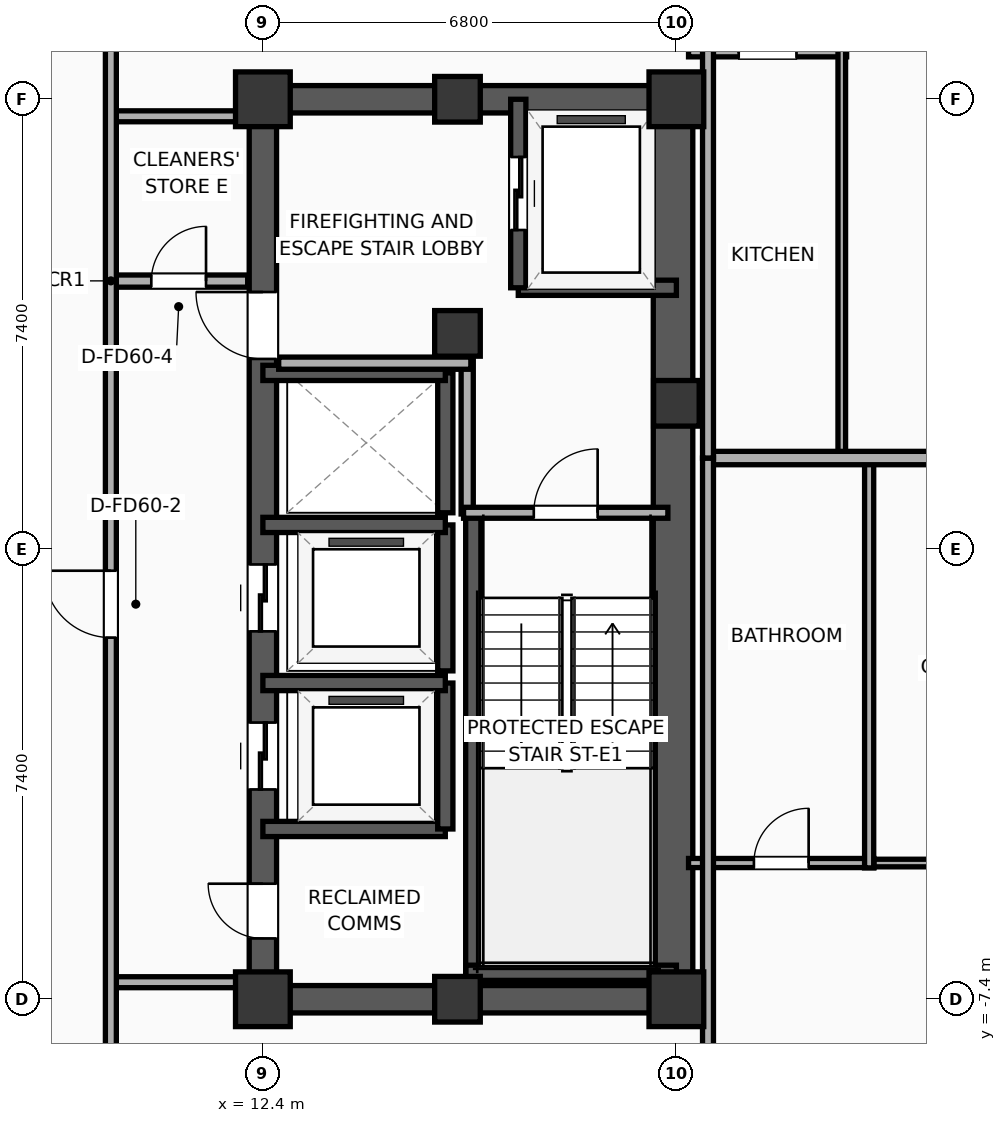
"""IFC4 building model, lengths in metres.
Left out: names, types, materials, properties, quantities, classifications, styles, units other than length and angle.
Written with IfcOpenShell. Run it as: python <this file> out.ifc"""

import sys

from ifc_helpers import new_model, si_unit, direction, frame, frame_2d, origin, origin_2d, place, context, subcontext, project, spatial, rectangle, extrude, element, fill, save


model = new_model("IFC4")
c1 = context("Model", 3, precision=1e-05, world=origin(), true_north=direction((0.0, 1.0)))
c2 = subcontext(c1, "Body", "Model", "MODEL_VIEW")
j1 = project(units=[si_unit("LENGTHUNIT", "METRE"), si_unit("PLANEANGLEUNIT", "RADIAN")], contexts=[c1])
p1 = place(None, origin())
s1 = spatial("IfcSite", under=j1, at=p1, CompositionType="ELEMENT")
p2 = place(p1, origin())
s2 = spatial("IfcBuilding", under=s1, at=p2, CompositionType="ELEMENT")
p3 = place(p2, frame((0.0, 0.0, 163.8)))
s3 = spatial("IfcBuildingStorey", under=s2, at=p3, CompositionType="ELEMENT", Elevation=163.8)
p4 = place(p3, frame((12.4, -7.4, 0.0), z_axis=(0.0, 0.0, 1.0), x_axis=(1.0, 0.0, 0.0)))
e1 = element("IfcColumn", 1, at=p4, inside=s3, PredefinedType="COLUMN", context=c2, shape_type="SweptSolid", body=[
    extrude(rectangle(XDim=0.9, YDim=0.9, at=origin_2d()), origin(), (0.0, 0.0, 1.0), 3.9),
])
p5 = place(p3, frame((15.6, 3.55, 0.0), z_axis=(0.0, 0.0, 1.0), x_axis=(1.0, 0.0, 0.0)))
e2 = element("IfcColumn", 2, at=p5, inside=s3, PredefinedType="COLUMN", context=c2, shape_type="SweptSolid", body=[
    extrude(rectangle(XDim=0.75, YDim=0.75, at=origin_2d()), origin(), (0.0, 0.0, 1.0), 3.9),
])
p6 = place(p3, frame((12.4, 7.4, 0.0), z_axis=(0.0, 0.0, 1.0), x_axis=(1.0, 0.0, 0.0)))
e3 = element("IfcColumn", 3, at=p6, inside=s3, PredefinedType="COLUMN", context=c2, shape_type="SweptSolid", body=[
    extrude(rectangle(XDim=0.9, YDim=0.9, at=origin_2d()), origin(), (0.0, 0.0, 1.0), 3.9),
])
for number, where, z_axis, x_axis in (
    (4, (15.6, -7.4, 0.0), (0.0, 0.0, 1.0), (1.0, 0.0, 0.0)),
    (5, (15.6, 7.4, 0.0), (0.0, 0.0, 1.0), (1.0, 0.0, 0.0)),
):
    element("IfcColumn", number, at=place(p3, frame(where, z_axis=z_axis, x_axis=x_axis)), inside=s3, PredefinedType="COLUMN", context=c2, shape_type="SweptSolid", body=[
        extrude(rectangle(XDim=0.75, YDim=0.75, at=origin_2d()), origin(), (0.0, 0.0, 1.0), 3.9),
    ])
p7 = place(p3, frame((19.2, -7.4, 0.0), z_axis=(0.0, 0.0, 1.0), x_axis=(1.0, 0.0, 0.0)))
e6 = element("IfcColumn", 6, at=p7, inside=s3, PredefinedType="COLUMN", context=c2, shape_type="SweptSolid", body=[
    extrude(rectangle(XDim=0.9, YDim=0.9, at=origin_2d()), origin(), (0.0, 0.0, 1.0), 3.9),
])
p8 = place(p3, frame((19.2, 2.4, 0.0), z_axis=(0.0, 0.0, 1.0), x_axis=(1.0, 0.0, 0.0)))
e7 = element("IfcColumn", 7, at=p8, inside=s3, PredefinedType="COLUMN", context=c2, shape_type="SweptSolid", body=[
    extrude(rectangle(XDim=0.75, YDim=0.75, at=origin_2d()), origin(), (0.0, 0.0, 1.0), 3.9),
])
p9 = place(p3, frame((19.2, 7.4, 0.0), z_axis=(0.0, 0.0, 1.0), x_axis=(1.0, 0.0, 0.0)))
e8 = element("IfcColumn", 8, at=p9, inside=s3, PredefinedType="COLUMN", context=c2, shape_type="SweptSolid", body=[
    extrude(rectangle(XDim=0.9, YDim=0.9, at=origin_2d()), origin(), (0.0, 0.0, 1.0), 3.9),
])
for number, where, z_axis, x_axis in (
    (9, (12.175, -7.4, 0.0), (0.0, 0.0, 1.0), (1.0, 0.0, 0.0)),
    (10, (12.175, 7.4, 0.0), (0.0, 0.0, 1.0), (1.0, 0.0, 0.0)),
):
    element("IfcWall", number, at=place(p3, frame(where, z_axis=z_axis, x_axis=x_axis)), inside=s3, PredefinedType="SHEAR", context=c2, shape_type="SweptSolid", body=[
        extrude(rectangle(XDim=7.25, YDim=0.45, at=frame_2d((3.625, 0.0))), origin(), (0.0, 0.0, 1.0), 3.65),
    ])
p10 = place(p3, frame((12.4, -7.4, 0.0), z_axis=(0.0, 0.0, 1.0), x_axis=(0.0, 1.0, 0.0)))
e11 = element("IfcWall", 11, at=p10, inside=s3, PredefinedType="SHEAR", context=c2, shape_type="SweptSolid", body=[
    extrude(rectangle(XDim=14.8, YDim=0.45, at=frame_2d((7.4, 0.0))), origin(), (0.0, 0.0, 1.0), 3.65),
])
p11 = place(p10, frame((3.45, 0.0, 0.0)))
e12 = element("IfcOpeningElement", 12, at=p11, cuts=e11, PredefinedType="OPENING", context=c2, shape_type="SweptSolid", body=[
    extrude(rectangle(XDim=1.1, YDim=2.05, at=frame_2d((0.55, 1.025))), frame((0.0, 0.235, 0.0), z_axis=(0.0, -1.0, 0.0), x_axis=(1.0, 0.0, 0.0)), (0.0, 0.0, 1.0), 0.47),
])
p12 = place(p10, frame((6.05, 0.0, 0.0)))
e13 = element("IfcOpeningElement", 13, at=p12, cuts=e11, PredefinedType="OPENING", context=c2, shape_type="SweptSolid", body=[
    extrude(rectangle(XDim=1.1, YDim=2.05, at=frame_2d((0.55, 1.025))), frame((0.0, 0.235, 0.0), z_axis=(0.0, -1.0, 0.0), x_axis=(1.0, 0.0, 0.0)), (0.0, 0.0, 1.0), 0.47),
])
p13 = place(p10, frame((10.53, 0.0, 0.0)))
e14 = element("IfcOpeningElement", 14, at=p13, cuts=e11, PredefinedType="OPENING", context=c2, shape_type="SweptSolid", body=[
    extrude(rectangle(XDim=1.1, YDim=2.05, at=frame_2d((0.55, 1.025))), frame((0.0, 0.235, 0.0), z_axis=(0.0, -1.0, 0.0), x_axis=(1.0, 0.0, 0.0)), (0.0, 0.0, 1.0), 0.47),
])
p14 = place(p10, frame((1.0, 0.0, 0.0)))
e15 = element("IfcOpeningElement", 15, at=p14, cuts=e11, PredefinedType="OPENING", context=c2, shape_type="SweptSolid", body=[
    extrude(rectangle(XDim=0.9, YDim=2.05, at=frame_2d((0.45, 1.025))), frame((0.0, 0.235, 0.0), z_axis=(0.0, -1.0, 0.0), x_axis=(1.0, 0.0, 0.0)), (0.0, 0.0, 1.0), 0.47),
])
p15 = place(p3, frame((19.145, -7.4, 0.0), z_axis=(0.0, 0.0, 1.0), x_axis=(0.0, 1.0, 0.0)))
e16 = element("IfcWall", 16, at=p15, inside=s3, PredefinedType="SHEAR", context=c2, shape_type="SweptSolid", body=[
    extrude(rectangle(XDim=14.8, YDim=0.65, at=frame_2d((7.4, 0.0))), origin(), (0.0, 0.0, 1.0), 3.65),
])
p16 = place(p3, frame((15.86, -7.085, 0.0), z_axis=(0.0, 0.0, 1.0), x_axis=(0.0, 1.0, 0.0)))
e17 = element("IfcWall", 17, at=p16, inside=s3, PredefinedType="SOLIDWALL", context=c2, shape_type="SweptSolid", body=[
    extrude(rectangle(XDim=7.685, YDim=0.25, at=frame_2d((3.843, 0.0))), origin(), (0.0, 0.0, 1.0), 3.65),
])
p17 = place(p3, frame((15.74, -6.965, 0.0), z_axis=(0.0, 0.0, 1.0), x_axis=(1.0, 0.0, 0.0)))
e18 = element("IfcWall", 18, at=p17, inside=s3, PredefinedType="SOLIDWALL", context=c2, shape_type="SweptSolid", body=[
    extrude(rectangle(XDim=3.46, YDim=0.25, at=frame_2d((1.73, 0.0))), origin(), (0.0, 0.0, 1.0), 3.65),
])
p18 = place(p3, frame((16.6, 4.3, 0.0), z_axis=(0.0, 0.0, 1.0), x_axis=(1.0, 0.0, 0.0)))
e19 = element("IfcWall", 19, at=p18, inside=s3, PredefinedType="SOLIDWALL", context=c2, shape_type="SweptSolid", body=[
    extrude(rectangle(XDim=2.6, YDim=0.25, at=frame_2d((1.3, 0.0))), origin(), (0.0, 0.0, 1.0), 3.65),
])
p19 = place(p3, frame((16.6, 7.4, 0.0), z_axis=(0.0, 0.0, 1.0), x_axis=(0.0, -1.0, 0.0)))
e20 = element("IfcWall", 20, at=p19, inside=s3, PredefinedType="SOLIDWALL", context=c2, shape_type="SweptSolid", body=[
    extrude(rectangle(XDim=3.1, YDim=0.25, at=frame_2d((1.55, 0.0))), origin(), (0.0, 0.0, 1.0), 3.65),
])
p20 = place(p19, frame((0.95, 0.0, 0.0)))
e21 = element("IfcOpeningElement", 21, at=p20, cuts=e20, PredefinedType="OPENING", context=c2, shape_type="SweptSolid", body=[
    extrude(rectangle(XDim=1.2, YDim=2.05, at=frame_2d((0.6, 1.025))), frame((0.0, 0.135, 0.0), z_axis=(0.0, -1.0, 0.0), x_axis=(1.0, 0.0, 0.0)), (0.0, 0.0, 1.0), 0.27),
])
p21 = place(p3, frame((12.4, -4.6, 0.0), z_axis=(0.0, 0.0, 1.0), x_axis=(1.0, 0.0, 0.0)))
e22 = element("IfcWall", 22, at=p21, inside=s3, PredefinedType="SOLIDWALL", context=c2, shape_type="SweptSolid", body=[
    extrude(rectangle(XDim=3.0, YDim=0.25, at=frame_2d((1.5, 0.0))), origin(), (0.0, 0.0, 1.0), 3.65),
])
p22 = place(p3, frame((15.4, -4.6, 0.0), z_axis=(0.0, 0.0, 1.0), x_axis=(0.0, 1.0, 0.0)))
e23 = element("IfcWall", 23, at=p22, inside=s3, PredefinedType="SOLIDWALL", context=c2, shape_type="SweptSolid", body=[
    extrude(rectangle(XDim=2.4, YDim=0.25, at=frame_2d((1.2, 0.0))), origin(), (0.0, 0.0, 1.0), 3.65),
])
p23 = place(p3, frame((15.4, -2.2, 0.0), z_axis=(0.0, 0.0, 1.0), x_axis=(-1.0, 0.0, 0.0)))
e24 = element("IfcWall", 24, at=p23, inside=s3, PredefinedType="SOLIDWALL", context=c2, shape_type="SweptSolid", body=[
    extrude(rectangle(XDim=3.0, YDim=0.25, at=frame_2d((1.5, 0.0))), origin(), (0.0, 0.0, 1.0), 3.65),
])
p24 = place(p3, frame((15.4, -2.0, 0.0), z_axis=(0.0, 0.0, 1.0), x_axis=(0.0, 1.0, 0.0)))
e25 = element("IfcWall", 25, at=p24, inside=s3, PredefinedType="SOLIDWALL", context=c2, shape_type="SweptSolid", body=[
    extrude(rectangle(XDim=2.4, YDim=0.25, at=frame_2d((1.2, 0.0))), origin(), (0.0, 0.0, 1.0), 3.65),
])
p25 = place(p3, frame((15.4, 0.4, 0.0), z_axis=(0.0, 0.0, 1.0), x_axis=(-1.0, 0.0, 0.0)))
e26 = element("IfcWall", 26, at=p25, inside=s3, PredefinedType="SOLIDWALL", context=c2, shape_type="SweptSolid", body=[
    extrude(rectangle(XDim=3.0, YDim=0.25, at=frame_2d((1.5, 0.0))), origin(), (0.0, 0.0, 1.0), 3.65),
])
p26 = place(p3, frame((15.4, 0.6, 0.0), z_axis=(0.0, 0.0, 1.0), x_axis=(0.0, 1.0, 0.0)))
e27 = element("IfcWall", 27, at=p26, inside=s3, PredefinedType="SOLIDWALL", context=c2, shape_type="SweptSolid", body=[
    extrude(rectangle(XDim=2.3, YDim=0.25, at=frame_2d((1.15, 0.0))), origin(), (0.0, 0.0, 1.0), 3.65),
])
p27 = place(p3, frame((15.4, 2.9, 0.0), z_axis=(0.0, 0.0, 1.0), x_axis=(-1.0, 0.0, 0.0)))
e28 = element("IfcWall", 28, at=p27, inside=s3, PredefinedType="SOLIDWALL", context=c2, shape_type="SweptSolid", body=[
    extrude(rectangle(XDim=3.0, YDim=0.25, at=frame_2d((1.5, 0.0))), origin(), (0.0, 0.0, 1.0), 3.65),
])
p28 = place(p3, frame((15.76, 0.58, 0.0), z_axis=(0.0, 0.0, 1.0), x_axis=(0.0, 1.0, 0.0)))
e29 = element("IfcWall", 29, at=p28, inside=s3, PredefinedType="PARTITIONING", context=c2, shape_type="SweptSolid", body=[
    extrude(rectangle(XDim=2.52, YDim=0.2, at=frame_2d((1.26, 0.0))), origin(), (0.0, 0.0, 1.0), 3.65),
])
p29 = place(p3, frame((12.66, 3.06, 0.0), z_axis=(0.0, 0.0, 1.0), x_axis=(1.0, 0.0, 0.0)))
e30 = element("IfcWall", 30, at=p29, inside=s3, PredefinedType="PARTITIONING", context=c2, shape_type="SweptSolid", body=[
    extrude(rectangle(XDim=3.16, YDim=0.2, at=frame_2d((1.58, 0.0))), origin(), (0.0, 0.0, 1.0), 3.65),
])
p30 = place(p3, frame((15.7, 0.6, 0.0), z_axis=(0.0, 0.0, 1.0), x_axis=(1.0, 0.0, 0.0)))
e31 = element("IfcWall", 31, at=p30, inside=s3, PredefinedType="PARTITIONING", context=c2, shape_type="SweptSolid", body=[
    extrude(rectangle(XDim=3.36, YDim=0.18, at=frame_2d((1.68, 0.0))), origin(), (0.0, 0.0, 1.0), 3.65),
])
p31 = place(p30, frame((1.155, 0.0, 0.0)))
e32 = element("IfcOpeningElement", 32, at=p31, cuts=e31, PredefinedType="OPENING", context=c2, shape_type="SweptSolid", body=[
    extrude(rectangle(XDim=1.05, YDim=2.05, at=frame_2d((0.525, 1.025))), frame((0.0, 0.1, 0.0), z_axis=(0.0, -1.0, 0.0), x_axis=(1.0, 0.0, 0.0)), (0.0, 0.0, 1.0), 0.2),
])
p32 = place(p3, frame((9.88, 4.41, 0.0), z_axis=(0.0, 0.0, 1.0), x_axis=(1.0, 0.0, 0.0)))
e33 = element("IfcWall", 33, at=p32, inside=s3, PredefinedType="PARTITIONING", context=c2, shape_type="SweptSolid", body=[
    extrude(rectangle(XDim=2.27, YDim=0.2, at=frame_2d((1.135, 0.0))), origin(), (0.0, 0.0, 1.0), 3.65),
])
p33 = place(p32, frame((0.685, 0.0, 0.0)))
e34 = element("IfcOpeningElement", 34, at=p33, cuts=e33, PredefinedType="OPENING", context=c2, shape_type="SweptSolid", body=[
    extrude(rectangle(XDim=0.9, YDim=2.05, at=frame_2d((0.45, 1.025))), frame((0.0, 0.11, 0.0), z_axis=(0.0, -1.0, 0.0), x_axis=(1.0, 0.0, 0.0)), (0.0, 0.0, 1.0), 0.22),
])
for number, where, z_axis, x_axis in (
    (35, (9.88, 7.12, 0.0), (0.0, 0.0, 1.0), (1.0, 0.0, 0.0)),
    (36, (9.88, -7.12, 0.0), (0.0, 0.0, 1.0), (1.0, 0.0, 0.0)),
):
    element("IfcWall", number, at=place(p3, frame(where, z_axis=z_axis, x_axis=x_axis)), inside=s3, PredefinedType="PARTITIONING", context=c2, shape_type="SweptSolid", body=[
        extrude(rectangle(XDim=2.27, YDim=0.18, at=frame_2d((1.135, 0.0))), origin(), (0.0, 0.0, 1.0), 3.65),
    ])
p34 = place(p3, frame((9.9, -9.03, 0.0), z_axis=(0.0, 0.0, 1.0), x_axis=(0.0, 1.0, 0.0)))
e37 = element("IfcWall", 37, at=p34, inside=s3, PredefinedType="PARTITIONING", context=c2, shape_type="SweptSolid", body=[
    extrude(rectangle(XDim=18.06, YDim=0.18, at=frame_2d((9.03, 0.0))), origin(), (0.0, 0.0, 1.0), 3.65),
])
p35 = place(p34, frame((7.577, 0.0, 0.0)))
e38 = element("IfcOpeningElement", 38, at=p35, cuts=e37, PredefinedType="OPENING", context=c2, shape_type="SweptSolid", body=[
    extrude(rectangle(XDim=1.1, YDim=2.05, at=frame_2d((0.55, 1.025))), frame((0.0, 0.1, 0.0), z_axis=(0.0, -1.0, 0.0), x_axis=(1.0, 0.0, 0.0)), (0.0, 0.0, 1.0), 0.2),
])
p36 = place(p3, frame((22.31, -5.16, 0.0), z_axis=(0.0, 0.0, 1.0), x_axis=(1.0, 0.0, 0.0)))
e39 = element("IfcWall", 39, at=p36, inside=s3, PredefinedType="PARTITIONING", context=c2, shape_type="SweptSolid", body=[
    extrude(rectangle(XDim=4.913, YDim=0.125, at=frame_2d((2.457, 0.0))), origin(), (0.0, 0.0, 1.0), 3.04),
])
p37 = place(p36, frame((1.761, 0.0, 0.0)))
e40 = element("IfcOpeningElement", 40, at=p37, cuts=e39, PredefinedType="OPENING", context=c2, shape_type="SweptSolid", body=[
    extrude(rectangle(XDim=0.9, YDim=2.05, at=frame_2d((0.45, 1.025))), frame((0.0, 0.073, 0.0), z_axis=(0.0, -1.0, 0.0), x_axis=(1.0, 0.0, 0.0)), (0.0, 0.0, 1.0), 0.145),
])
p38 = place(p3, frame((19.4, -5.16, 0.0), z_axis=(0.0, 0.0, 1.0), x_axis=(1.0, 0.0, 0.0)))
e41 = element("IfcWall", 41, at=p38, inside=s3, PredefinedType="PLUMBINGWALL", context=c2, shape_type="SweptSolid", body=[
    extrude(rectangle(XDim=3.05, YDim=0.15, at=frame_2d((1.525, 0.0))), origin(), (0.0, 0.0, 1.0), 3.65),
])
p39 = place(p38, frame((1.075, 0.0, 0.0)))
e42 = element("IfcOpeningElement", 42, at=p39, cuts=e41, PredefinedType="OPENING", context=c2, shape_type="SweptSolid", body=[
    extrude(rectangle(XDim=0.9, YDim=2.05, at=frame_2d((0.45, 1.025))), frame((0.0, 0.085, 0.0), z_axis=(0.0, -1.0, 0.0), x_axis=(1.0, 0.0, 0.0)), (0.0, 0.0, 1.0), 0.17),
])
p40 = place(p3, frame((22.37, -5.24, 0.0), z_axis=(0.0, 0.0, 1.0), x_axis=(0.0, 1.0, 0.0)))
e43 = element("IfcWall", 43, at=p40, inside=s3, PredefinedType="PLUMBINGWALL", context=c2, shape_type="SweptSolid", body=[
    extrude(rectangle(XDim=6.72, YDim=0.15, at=frame_2d((3.36, 0.0))), origin(), (0.0, 0.0, 1.0), 3.65),
])
p41 = place(p3, frame((19.4, 8.16, 0.0), z_axis=(0.0, 0.0, 1.0), x_axis=(1.0, 0.0, 0.0)))
e44 = element("IfcWall", 44, at=p41, inside=s3, PredefinedType="PARTITIONING", context=c2, shape_type="SweptSolid", body=[
    extrude(rectangle(XDim=2.6, YDim=0.125, at=frame_2d((1.3, 0.0))), origin(), (0.0, 0.0, 1.0), 3.04),
])
p42 = place(p41, frame((0.825, 0.0, 0.0)))
e45 = element("IfcOpeningElement", 45, at=p42, cuts=e44, PredefinedType="OPENING", context=c2, shape_type="SweptSolid", body=[
    extrude(rectangle(XDim=0.95, YDim=2.05, at=frame_2d((0.475, 1.025))), frame((0.0, 0.073, 0.0), z_axis=(0.0, -1.0, 0.0), x_axis=(1.0, 0.0, 0.0)), (0.0, 0.0, 1.0), 0.145),
])
p43 = place(p3, frame((21.92, 1.52, 0.0), z_axis=(0.0, 0.0, 1.0), x_axis=(0.0, 1.0, 0.0)))
e46 = element("IfcWall", 46, at=p43, inside=s3, PredefinedType="PARTITIONING", context=c2, shape_type="SweptSolid", body=[
    extrude(rectangle(XDim=6.72, YDim=0.125, at=frame_2d((3.36, 0.0))), origin(), (0.0, 0.0, 1.0), 3.65),
])
p44 = place(p3, frame((19.72, 1.5, 0.0), z_axis=(0.0, 0.0, 1.0), x_axis=(1.0, 0.0, 0.0)))
e47 = element("IfcWall", 47, at=p44, inside=s3, PredefinedType="PARTITIONING", context=c2, shape_type="SweptSolid", body=[
    extrude(rectangle(XDim=6.653, YDim=0.22, at=frame_2d((3.326, 0.0))), origin(), (0.0, 0.0, 1.0), 3.65),
])
p45 = place(p3, frame((19.72, -18.532, 0.0), z_axis=(0.0, 0.0, 1.0), x_axis=(0.0, 1.0, 0.0)))
e48 = element("IfcWall", 48, at=p45, inside=s3, PredefinedType="PARTITIONING", context=c2, shape_type="SweptSolid", body=[
    extrude(rectangle(XDim=20.032, YDim=0.18, at=frame_2d((10.016, 0.0))), origin(), (0.0, 0.0, 1.0), 3.65),
])
p46 = place(p45, frame((8.402, 0.0, 0.0)))
e49 = element("IfcOpeningElement", 49, at=p46, cuts=e48, PredefinedType="OPENING", context=c2, shape_type="SweptSolid", body=[
    extrude(rectangle(XDim=0.9, YDim=2.05, at=frame_2d((0.45, 1.025))), frame((0.0, 0.1, 0.0), z_axis=(0.0, -1.0, 0.0), x_axis=(1.0, 0.0, 0.0)), (0.0, 0.0, 1.0), 0.2),
])
p47 = place(p3, frame((19.72, 1.5, 0.0), z_axis=(0.0, 0.0, 1.0), x_axis=(0.0, 1.0, 0.0)))
e50 = element("IfcWall", 50, at=p47, inside=s3, PredefinedType="PARTITIONING", context=c2, shape_type="SweptSolid", body=[
    extrude(rectangle(XDim=20.65, YDim=0.18, at=frame_2d((10.325, 0.0))), origin(), (0.0, 0.0, 1.0), 3.04),
])
p48 = place(p47, frame((7.729, 0.0, 0.0)))
e51 = element("IfcOpeningElement", 51, at=p48, cuts=e50, PredefinedType="OPENING", context=c2, shape_type="SweptSolid", body=[
    extrude(rectangle(XDim=0.9, YDim=2.05, at=frame_2d((0.45, 1.025))), frame((0.0, 0.1, 0.0), z_axis=(0.0, -1.0, 0.0), x_axis=(1.0, 0.0, 0.0)), (0.0, 0.0, 1.0), 0.2),
])
p49 = place(p20, origin())
e52 = element("IfcDoor", 52, at=p49, inside=s3, OperationType="SLIDING_TO_LEFT", PredefinedType="DOOR", context=c2, shape_type="SweptSolid", body=[
    extrude(rectangle(XDim=1.2, YDim=2.05, at=frame_2d((0.6, 1.025))), frame((0.0, 0.025, 0.0), z_axis=(0.0, -1.0, 0.0), x_axis=(1.0, 0.0, 0.0)), (0.0, 0.0, 1.0), 0.05),
])
fill(e21, e52)
p50 = place(p11, origin())
e53 = element("IfcDoor", 53, at=p50, inside=s3, OperationType="SLIDING_TO_LEFT", PredefinedType="DOOR", context=c2, shape_type="SweptSolid", body=[
    extrude(rectangle(XDim=1.1, YDim=2.05, at=frame_2d((0.55, 1.025))), frame((0.0, 0.025, 0.0), z_axis=(0.0, -1.0, 0.0), x_axis=(1.0, 0.0, 0.0)), (0.0, 0.0, 1.0), 0.05),
])
fill(e12, e53)
p51 = place(p12, origin())
e54 = element("IfcDoor", 54, at=p51, inside=s3, OperationType="SLIDING_TO_LEFT", PredefinedType="DOOR", context=c2, shape_type="SweptSolid", body=[
    extrude(rectangle(XDim=1.1, YDim=2.05, at=frame_2d((0.55, 1.025))), frame((0.0, 0.025, 0.0), z_axis=(0.0, -1.0, 0.0), x_axis=(1.0, 0.0, 0.0)), (0.0, 0.0, 1.0), 0.05),
])
fill(e13, e54)
p52 = place(p31, origin())
e55 = element("IfcDoor", 55, at=p52, inside=s3, OperationType="SINGLE_SWING_RIGHT", PredefinedType="DOOR", context=c2, shape_type="SweptSolid", body=[
    extrude(rectangle(XDim=1.05, YDim=2.05, at=frame_2d((0.525, 1.025))), frame((0.0, 0.025, 0.0), z_axis=(0.0, -1.0, 0.0), x_axis=(1.0, 0.0, 0.0)), (0.0, 0.0, 1.0), 0.05),
])
fill(e32, e55)
p53 = place(p33, origin())
e56 = element("IfcDoor", 56, at=p53, inside=s3, OperationType="SINGLE_SWING_RIGHT", PredefinedType="DOOR", context=c2, shape_type="SweptSolid", body=[
    extrude(rectangle(XDim=0.9, YDim=2.05, at=frame_2d((0.45, 1.025))), frame((0.0, 0.025, 0.0), z_axis=(0.0, -1.0, 0.0), x_axis=(1.0, 0.0, 0.0)), (0.0, 0.0, 1.0), 0.05),
])
fill(e34, e56)
p54 = place(p35, origin())
e57 = element("IfcDoor", 57, at=p54, inside=s3, OperationType="SINGLE_SWING_RIGHT", PredefinedType="DOOR", context=c2, shape_type="SweptSolid", body=[
    extrude(rectangle(XDim=1.1, YDim=2.05, at=frame_2d((0.55, 1.025))), frame((0.0, 0.025, 0.0), z_axis=(0.0, -1.0, 0.0), x_axis=(1.0, 0.0, 0.0)), (0.0, 0.0, 1.0), 0.05),
])
fill(e38, e57)
p55 = place(p39, origin())
e58 = element("IfcDoor", 58, at=p55, inside=s3, OperationType="SINGLE_SWING_RIGHT", PredefinedType="DOOR", context=c2, shape_type="SweptSolid", body=[
    extrude(rectangle(XDim=0.9, YDim=2.05, at=frame_2d((0.45, 1.025))), frame((0.0, 0.025, 0.0), z_axis=(0.0, -1.0, 0.0), x_axis=(1.0, 0.0, 0.0)), (0.0, 0.0, 1.0), 0.05),
])
fill(e42, e58)
p56 = place(p42, origin())
e59 = element("IfcDoor", 59, at=p56, inside=s3, OperationType="SINGLE_SWING_LEFT", PredefinedType="DOOR", context=c2, shape_type="SweptSolid", body=[
    extrude(rectangle(XDim=0.95, YDim=2.05, at=frame_2d((0.475, 1.025))), frame((0.0, 0.025, 0.0), z_axis=(0.0, -1.0, 0.0), x_axis=(1.0, 0.0, 0.0)), (0.0, 0.0, 1.0), 0.05),
])
fill(e45, e59)
p57 = place(p13, origin())
e60 = element("IfcDoor", 60, at=p57, inside=s3, OperationType="SINGLE_SWING_RIGHT", PredefinedType="DOOR", context=c2, shape_type="SweptSolid", body=[
    extrude(rectangle(XDim=1.1, YDim=2.05, at=frame_2d((0.55, 1.025))), frame((0.0, 0.025, 0.0), z_axis=(0.0, -1.0, 0.0), x_axis=(1.0, 0.0, 0.0)), (0.0, 0.0, 1.0), 0.05),
])
fill(e14, e60)
p58 = place(p14, origin())
e61 = element("IfcDoor", 61, at=p58, inside=s3, OperationType="SINGLE_SWING_RIGHT", PredefinedType="DOOR", context=c2, shape_type="SweptSolid", body=[
    extrude(rectangle(XDim=0.9, YDim=2.05, at=frame_2d((0.45, 1.025))), frame((0.0, 0.025, 0.0), z_axis=(0.0, -1.0, 0.0), x_axis=(1.0, 0.0, 0.0)), (0.0, 0.0, 1.0), 0.05),
])
fill(e15, e61)
save(model, sys.argv[1])
